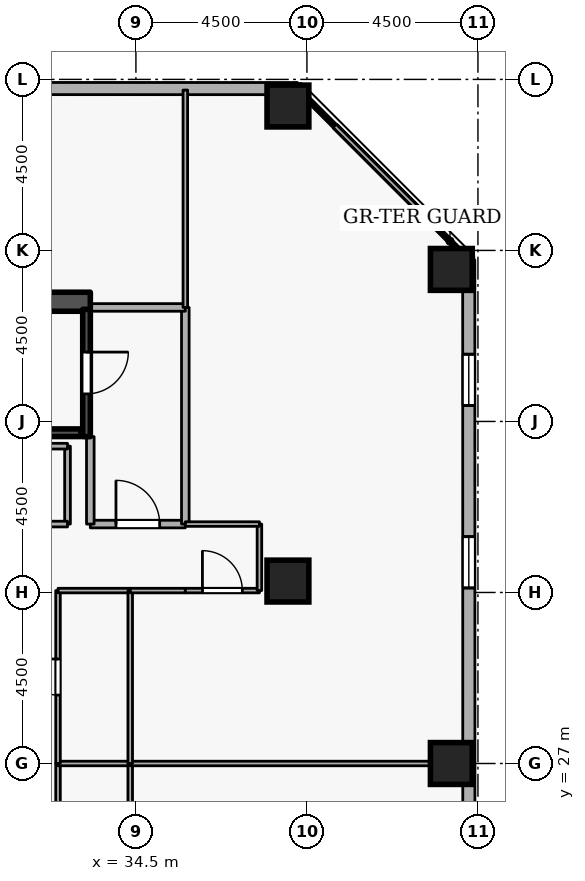
"""IFC4 building model, lengths in metres.
Left out: names, types, materials, properties, quantities, classifications, styles, units other than length and angle.
Written with IfcOpenShell. Run it as: python <this file> out.ifc"""

import sys

from ifc_helpers import new_model, si_unit, direction, frame, frame_2d, origin, origin_2d, place, context, subcontext, project, spatial, rectangle, extrude, element, fill, save


model = new_model("IFC4")
c1 = context("Model", 3, precision=1e-05, world=origin(), true_north=direction((0.0, 1.0)))
c2 = subcontext(c1, "Body", "Model", "MODEL_VIEW")
j1 = project(units=[si_unit("LENGTHUNIT", "METRE"), si_unit("PLANEANGLEUNIT", "RADIAN")], contexts=[c1])
p1 = place(None, origin())
s1 = spatial("IfcSite", under=j1, at=p1, CompositionType="ELEMENT")
p2 = place(p1, origin())
s2 = spatial("IfcBuilding", under=s1, at=p2, CompositionType="ELEMENT")
p3 = place(p2, frame((0.0, 0.0, 145.5)))
s3 = spatial("IfcBuildingStorey", under=s2, at=p3, CompositionType="ELEMENT", Elevation=145.5)
p4 = place(p3, frame((17.7, 39.15, 0.0), z_axis=(0.0, 0.0, 1.0), x_axis=(1.0, 0.0, 0.0)))
e1 = element("IfcWall", 1, at=p4, inside=s3, PredefinedType="SHEAR", context=c2, shape_type="SweptSolid", body=[
    extrude(rectangle(XDim=15.6, YDim=0.5, at=frame_2d((7.8, 0.0))), origin(), (0.0, 0.0, 1.0), 3.6),
])
for number, where, z_axis, x_axis in (
    (2, (42.8, 27.0, 0.0), (0.0, 0.0, 1.0), (1.0, 0.0, 0.0)),
    (3, (42.8, 40.0, 0.0), (0.0, 0.0, 1.0), (1.0, 0.0, 0.0)),
    (4, (38.5, 44.3, 0.0), (0.0, 0.0, 1.0), (1.0, 0.0, 0.0)),
    (5, (38.5, 31.8, 0.0), (0.0, 0.0, 1.0), (1.0, 0.0, 0.0)),
):
    element("IfcColumn", number, at=place(p3, frame(where, z_axis=z_axis, x_axis=x_axis)), inside=s3, PredefinedType="COLUMN", context=c2, shape_type="SweptSolid", body=[
        extrude(rectangle(XDim=1.1, YDim=1.1, at=origin_2d()), origin(), (0.0, 0.0, 1.0), 3.6),
    ])
p5 = place(p3, frame((43.265, 5.819, 0.0), z_axis=(0.0, 0.0, 1.0), x_axis=(-0.000184351399, 0.999999983007, 0.0)))
e6 = element("IfcWall", 6, at=p5, inside=s3, PredefinedType="STANDARD", context=c2, shape_type="SweptSolid", body=[
    extrude(rectangle(XDim=34.432, YDim=0.32, at=frame_2d((17.216, 0.0))), origin(), (0.0, 0.0, 1.0), 2.22),
])
p6 = place(p5, frame((1.8, 0.0, 0.72)))
e7 = element("IfcOpeningElement", 7, at=p6, cuts=e6, PredefinedType="OPENING", context=c2, shape_type="SweptSolid", body=[
    extrude(rectangle(XDim=1.35, YDim=1.05, at=frame_2d((0.675, 0.525))), frame((0.0, 0.17, 0.0), z_axis=(0.0, -1.0, 0.0), x_axis=(1.0, 0.0, 0.0)), (0.0, 0.0, 1.0), 0.34),
])
p7 = place(p5, frame((11.4, 0.0, 0.72)))
e8 = element("IfcOpeningElement", 8, at=p7, cuts=e6, PredefinedType="OPENING", context=c2, shape_type="SweptSolid", body=[
    extrude(rectangle(XDim=1.35, YDim=1.05, at=frame_2d((0.675, 0.525))), frame((0.0, 0.17, 0.0), z_axis=(0.0, -1.0, 0.0), x_axis=(1.0, 0.0, 0.0)), (0.0, 0.0, 1.0), 0.34),
])
p8 = place(p5, frame((16.2, 0.0, 0.72)))
e9 = element("IfcOpeningElement", 9, at=p8, cuts=e6, PredefinedType="OPENING", context=c2, shape_type="SweptSolid", body=[
    extrude(rectangle(XDim=1.35, YDim=1.05, at=frame_2d((0.675, 0.525))), frame((0.0, 0.17, 0.0), z_axis=(0.0, -1.0, 0.0), x_axis=(1.0, 0.0, 0.0)), (0.0, 0.0, 1.0), 0.34),
])
p9 = place(p5, frame((25.8, 0.0, 0.72)))
e10 = element("IfcOpeningElement", 10, at=p9, cuts=e6, PredefinedType="OPENING", context=c2, shape_type="SweptSolid", body=[
    extrude(rectangle(XDim=1.35, YDim=1.05, at=frame_2d((0.675, 0.525))), frame((0.0, 0.17, 0.0), z_axis=(0.0, -1.0, 0.0), x_axis=(1.0, 0.0, 0.0)), (0.0, 0.0, 1.0), 0.34),
])
p10 = place(p5, frame((30.6, 0.0, 0.72)))
e11 = element("IfcOpeningElement", 11, at=p10, cuts=e6, PredefinedType="OPENING", context=c2, shape_type="SweptSolid", body=[
    extrude(rectangle(XDim=1.35, YDim=1.05, at=frame_2d((0.675, 0.525))), frame((0.0, 0.17, 0.0), z_axis=(0.0, -1.0, 0.0), x_axis=(1.0, 0.0, 0.0)), (0.0, 0.0, 1.0), 0.34),
])
p11 = place(p3, frame((38.751, 44.758, 0.0), z_axis=(0.0, 0.0, 1.0), x_axis=(-0.999999983007, 0.000184351399, 0.0)))
e12 = element("IfcWall", 12, at=p11, inside=s3, PredefinedType="STANDARD", context=c2, shape_type="SweptSolid", body=[
    extrude(rectangle(XDim=34.432, YDim=0.32, at=frame_2d((17.216, 0.0))), origin(), (0.0, 0.0, 1.0), 2.22),
])
p12 = place(p11, frame((30.6, 0.0, 0.72)))
e13 = element("IfcOpeningElement", 13, at=p12, cuts=e12, PredefinedType="OPENING", context=c2, shape_type="SweptSolid", body=[
    extrude(rectangle(XDim=1.35, YDim=1.05, at=frame_2d((0.675, 0.525))), frame((0.0, 0.17, 0.0), z_axis=(0.0, -1.0, 0.0), x_axis=(1.0, 0.0, 0.0)), (0.0, 0.0, 1.0), 0.34),
])
p13 = place(p3, frame((33.2, 38.95, 0.0), z_axis=(0.0, 0.0, 1.0), x_axis=(0.0, -1.0, 0.0)))
e14 = element("IfcWall", 14, at=p13, inside=s3, PredefinedType="SHEAR", context=c2, shape_type="SweptSolid", body=[
    extrude(rectangle(XDim=3.35, YDim=0.2, at=frame_2d((1.675, 0.0))), origin(), (0.0, 0.0, 1.0), 3.6),
])
p14 = place(p13, frame((1.125, 0.0, 0.0)))
e15 = element("IfcOpeningElement", 15, at=p14, cuts=e14, PredefinedType="OPENING", context=c2, shape_type="SweptSolid", body=[
    extrude(rectangle(XDim=1.1, YDim=2.1, at=frame_2d((0.55, 1.05))), frame((0.0, 0.11, 0.0), z_axis=(0.0, -1.0, 0.0), x_axis=(1.0, 0.0, 0.0)), (0.0, 0.0, 1.0), 0.22),
])
p15 = place(p3, frame((25.95, 35.703, 0.0), z_axis=(0.0, 0.0, 1.0), x_axis=(1.0, 0.0, 0.0)))
e16 = element("IfcWall", 16, at=p15, inside=s3, PredefinedType="SHEAR", context=c2, shape_type="SweptSolid", body=[
    extrude(rectangle(XDim=7.1, YDim=0.2, at=frame_2d((3.55, 0.0))), origin(), (0.0, 0.0, 1.0), 3.6),
])
p16 = place(p3, frame((33.3, 33.3, 0.0), z_axis=(0.0, 0.0, 1.0), x_axis=(1.0, 0.0, 0.0)))
e17 = element("IfcWall", 17, at=p16, inside=s3, PredefinedType="STANDARD", context=c2, shape_type="SweptSolid", body=[
    extrude(rectangle(XDim=2.5, YDim=0.2, at=frame_2d((1.25, 0.0))), origin(), (0.0, 0.0, 1.0), 3.3),
])
p17 = place(p16, frame((0.675, 0.0, 0.0)))
e18 = element("IfcOpeningElement", 18, at=p17, cuts=e17, PredefinedType="OPENING", context=c2, shape_type="SweptSolid", body=[
    extrude(rectangle(XDim=1.15, YDim=2.1, at=frame_2d((0.575, 1.05))), frame((0.0, 0.11, 0.0), z_axis=(0.0, -1.0, 0.0), x_axis=(1.0, 0.0, 0.0)), (0.0, 0.0, 1.0), 0.22),
])
p18 = place(p3, frame((35.8, 33.3, 0.0), z_axis=(0.0, 0.0, 1.0), x_axis=(0.0, 1.0, 0.0)))
e19 = element("IfcWall", 19, at=p18, inside=s3, PredefinedType="STANDARD", context=c2, shape_type="SweptSolid", body=[
    extrude(rectangle(XDim=5.7, YDim=0.2, at=frame_2d((2.85, 0.0))), origin(), (0.0, 0.0, 1.0), 3.3),
])
p19 = place(p3, frame((35.8, 39.0, 0.0), z_axis=(0.0, 0.0, 1.0), x_axis=(-1.0, 0.0, 0.0)))
e20 = element("IfcWall", 20, at=p19, inside=s3, PredefinedType="STANDARD", context=c2, shape_type="SweptSolid", body=[
    extrude(rectangle(XDim=2.5, YDim=0.2, at=frame_2d((1.25, 0.0))), origin(), (0.0, 0.0, 1.0), 3.3),
])
p20 = place(p3, frame((33.3, 35.6, 0.0), z_axis=(0.0, 0.0, 1.0), x_axis=(0.0, -1.0, 0.0)))
e21 = element("IfcWall", 21, at=p20, inside=s3, PredefinedType="STANDARD", context=c2, shape_type="SweptSolid", body=[
    extrude(rectangle(XDim=2.3, YDim=0.2, at=frame_2d((1.15, 0.0))), origin(), (0.0, 0.0, 1.0), 2.505),
])
p21 = place(p3, frame((32.7, 35.35, 0.0), z_axis=(0.0, 0.0, 1.0), x_axis=(0.0, -1.0, 0.0)))
e22 = element("IfcWall", 22, at=p21, inside=s3, PredefinedType="PARTITIONING", context=c2, shape_type="SweptSolid", body=[
    extrude(rectangle(XDim=2.05, YDim=0.15, at=frame_2d((1.025, 0.0))), origin(), (0.0, 0.0, 1.0), 2.505),
])
p22 = place(p3, frame((32.7, 33.3, 0.0), z_axis=(0.0, 0.0, 1.0), x_axis=(-1.0, 0.0, 0.0)))
e23 = element("IfcWall", 23, at=p22, inside=s3, PredefinedType="PARTITIONING", context=c2, shape_type="SweptSolid", body=[
    extrude(rectangle(XDim=2.35, YDim=0.15, at=frame_2d((1.175, 0.0))), origin(), (0.0, 0.0, 1.0), 3.3),
])
p23 = place(p22, frame((0.715, 0.0, 0.0)))
e24 = element("IfcOpeningElement", 24, at=p23, cuts=e23, PredefinedType="OPENING", context=c2, shape_type="SweptSolid", body=[
    extrude(rectangle(XDim=0.92, YDim=2.08, at=frame_2d((0.46, 1.04))), frame((0.0, 0.085, 0.0), z_axis=(0.0, -1.0, 0.0), x_axis=(1.0, 0.0, 0.0)), (0.0, 0.0, 1.0), 0.17),
])
p24 = place(p3, frame((30.35, 35.35, 0.0), z_axis=(0.0, 0.0, 1.0), x_axis=(1.0, 0.0, 0.0)))
e25 = element("IfcWall", 25, at=p24, inside=s3, PredefinedType="PARTITIONING", context=c2, shape_type="SweptSolid", body=[
    extrude(rectangle(XDim=2.35, YDim=0.15, at=frame_2d((1.175, 0.0))), origin(), (0.0, 0.0, 1.0), 3.3),
])
p25 = place(p3, frame((32.45, 22.45, 0.0), z_axis=(0.0, 0.0, 1.0), x_axis=(0.0, 1.0, 0.0)))
e26 = element("IfcWall", 26, at=p25, inside=s3, PredefinedType="PARTITIONING", context=c2, shape_type="SweptSolid", body=[
    extrude(rectangle(XDim=4.55, YDim=0.12, at=frame_2d((2.275, 0.0))), origin(), (0.0, 0.0, 1.0), 3.3),
])
p26 = place(p25, frame((1.8, 0.0, 0.0)))
e27 = element("IfcOpeningElement", 27, at=p26, cuts=e26, PredefinedType="OPENING", context=c2, shape_type="SweptSolid", body=[
    extrude(rectangle(XDim=0.95, YDim=2.1, at=frame_2d((0.475, 1.05))), frame((0.0, 0.07, 0.0), z_axis=(0.0, -1.0, 0.0), x_axis=(1.0, 0.0, 0.0)), (0.0, 0.0, 1.0), 0.14),
])
p27 = place(p3, frame((32.45, 27.0, 0.0), z_axis=(0.0, 0.0, 1.0), x_axis=(1.0, 0.0, 0.0)))
e28 = element("IfcWall", 28, at=p27, inside=s3, PredefinedType="PARTITIONING", context=c2, shape_type="SweptSolid", body=[
    extrude(rectangle(XDim=1.9, YDim=0.12, at=frame_2d((0.95, 0.0))), origin(), (0.0, 0.0, 1.0), 1.685),
])
p28 = place(p3, frame((34.35, 27.0, 0.0), z_axis=(0.0, 0.0, 1.0), x_axis=(0.0, -1.0, 0.0)))
e29 = element("IfcWall", 29, at=p28, inside=s3, PredefinedType="PARTITIONING", context=c2, shape_type="SweptSolid", body=[
    extrude(rectangle(XDim=4.55, YDim=0.12, at=frame_2d((2.275, 0.0))), origin(), (0.0, 0.0, 1.0), 3.3),
])
p29 = place(p3, frame((34.35, 27.0, 0.0), z_axis=(0.0, 0.0, 1.0), x_axis=(1.0, 0.0, 0.0)))
e30 = element("IfcWall", 30, at=p29, inside=s3, PredefinedType="PARTITIONING", context=c2, shape_type="SweptSolid", body=[
    extrude(rectangle(XDim=8.87, YDim=0.12, at=frame_2d((4.435, 0.0))), origin(), (0.0, 0.0, 1.0), 1.685),
])
p30 = place(p3, frame((32.45, 27.0, 0.0), z_axis=(0.0, 0.0, 1.0), x_axis=(0.0, 1.0, 0.0)))
e31 = element("IfcWall", 31, at=p30, inside=s3, PredefinedType="PARTITIONING", context=c2, shape_type="SweptSolid", body=[
    extrude(rectangle(XDim=4.55, YDim=0.12, at=frame_2d((2.275, 0.0))), origin(), (0.0, 0.0, 1.0), 3.3),
])
p31 = place(p30, frame((1.8, 0.0, 0.0)))
e32 = element("IfcOpeningElement", 32, at=p31, cuts=e31, PredefinedType="OPENING", context=c2, shape_type="SweptSolid", body=[
    extrude(rectangle(XDim=0.95, YDim=2.1, at=frame_2d((0.475, 1.05))), frame((0.0, 0.07, 0.0), z_axis=(0.0, -1.0, 0.0), x_axis=(1.0, 0.0, 0.0)), (0.0, 0.0, 1.0), 0.14),
])
p32 = place(p3, frame((32.45, 31.55, 0.0), z_axis=(0.0, 0.0, 1.0), x_axis=(1.0, 0.0, 0.0)))
e33 = element("IfcWall", 33, at=p32, inside=s3, PredefinedType="PARTITIONING", context=c2, shape_type="SweptSolid", body=[
    extrude(rectangle(XDim=1.9, YDim=0.12, at=frame_2d((0.95, 0.0))), origin(), (0.0, 0.0, 1.0), 3.3),
])
p33 = place(p3, frame((34.35, 31.55, 0.0), z_axis=(0.0, 0.0, 1.0), x_axis=(0.0, -1.0, 0.0)))
e34 = element("IfcWall", 34, at=p33, inside=s3, PredefinedType="PARTITIONING", context=c2, shape_type="SweptSolid", body=[
    extrude(rectangle(XDim=4.55, YDim=0.12, at=frame_2d((2.275, 0.0))), origin(), (0.0, 0.0, 1.0), 3.3),
])
p34 = place(p3, frame((34.35, 31.55, 0.0), z_axis=(0.0, 0.0, 1.0), x_axis=(1.0, 0.0, 0.0)))
e35 = element("IfcWall", 35, at=p34, inside=s3, PredefinedType="PARTITIONING", context=c2, shape_type="SweptSolid", body=[
    extrude(rectangle(XDim=1.45, YDim=0.12, at=frame_2d((0.725, 0.0))), origin(), (0.0, 0.0, 1.0), 3.3),
])
p35 = place(p3, frame((35.8, 31.55, 0.0), z_axis=(0.0, 0.0, 1.0), x_axis=(1.0, 0.0, 0.0)))
e36 = element("IfcWall", 36, at=p35, inside=s3, PredefinedType="PARTITIONING", context=c2, shape_type="SweptSolid", body=[
    extrude(rectangle(XDim=1.95, YDim=0.12, at=frame_2d((0.975, 0.0))), origin(), (0.0, 0.0, 1.0), 3.3),
])
p36 = place(p35, frame((0.45, 0.0, 0.0)))
e37 = element("IfcOpeningElement", 37, at=p36, cuts=e36, PredefinedType="OPENING", context=c2, shape_type="SweptSolid", body=[
    extrude(rectangle(XDim=1.05, YDim=2.1, at=frame_2d((0.525, 1.05))), frame((0.0, 0.07, 0.0), z_axis=(0.0, -1.0, 0.0), x_axis=(1.0, 0.0, 0.0)), (0.0, 0.0, 1.0), 0.14),
])
p37 = place(p3, frame((37.75, 31.55, 0.0), z_axis=(0.0, 0.0, 1.0), x_axis=(0.0, 1.0, 0.0)))
e38 = element("IfcWall", 38, at=p37, inside=s3, PredefinedType="PARTITIONING", context=c2, shape_type="SweptSolid", body=[
    extrude(rectangle(XDim=1.75, YDim=0.12, at=frame_2d((0.875, 0.0))), origin(), (0.0, 0.0, 1.0), 3.3),
])
p38 = place(p3, frame((37.75, 33.3, 0.0), z_axis=(0.0, 0.0, 1.0), x_axis=(-1.0, 0.0, 0.0)))
e39 = element("IfcWall", 39, at=p38, inside=s3, PredefinedType="PARTITIONING", context=c2, shape_type="SweptSolid", body=[
    extrude(rectangle(XDim=1.95, YDim=0.12, at=frame_2d((0.975, 0.0))), origin(), (0.0, 0.0, 1.0), 3.3),
])
p39 = place(p3, frame((35.8, 39.0, 0.0), z_axis=(0.0, 0.0, 1.0), x_axis=(0.0, 1.0, 0.0)))
e40 = element("IfcWall", 40, at=p39, inside=s3, PredefinedType="PARTITIONING", context=c2, shape_type="SweptSolid", body=[
    extrude(rectangle(XDim=5.72, YDim=0.12, at=frame_2d((2.86, 0.0))), origin(), (0.0, 0.0, 1.0), 3.3),
])
p40 = place(p3, frame((38.787, 44.72, 0.0), z_axis=(0.0, 0.0, 1.0), x_axis=(0.707106781187, -0.707106781187, 0.0)))
e41 = element("IfcWall", 41, at=p40, inside=s3, PredefinedType="PARTITIONING", context=c2, shape_type="SweptSolid", body=[
    extrude(rectangle(XDim=6.269, YDim=0.12, at=frame_2d((3.134, 0.0))), origin(), (0.0, 0.0, 1.0), 3.3),
])
p41 = place(p9, origin())
e42 = element("IfcWindow", 42, at=p41, inside=s3, PartitioningType="SINGLE_PANEL", PredefinedType="WINDOW", context=c2, shape_type="SweptSolid", body=[
    extrude(rectangle(XDim=1.35, YDim=1.05, at=frame_2d((0.675, 0.525))), frame((0.0, 0.03, 0.0), z_axis=(0.0, -1.0, 0.0), x_axis=(1.0, 0.0, 0.0)), (0.0, 0.0, 1.0), 0.06),
])
fill(e10, e42)
p42 = place(p10, origin())
e43 = element("IfcWindow", 43, at=p42, inside=s3, PartitioningType="SINGLE_PANEL", PredefinedType="WINDOW", context=c2, shape_type="SweptSolid", body=[
    extrude(rectangle(XDim=1.35, YDim=1.05, at=frame_2d((0.675, 0.525))), frame((0.0, 0.03, 0.0), z_axis=(0.0, -1.0, 0.0), x_axis=(1.0, 0.0, 0.0)), (0.0, 0.0, 1.0), 0.06),
])
fill(e11, e43)
p43 = place(p14, origin())
e44 = element("IfcDoor", 44, at=p43, inside=s3, OperationType="SINGLE_SWING_LEFT", PredefinedType="DOOR", context=c2, shape_type="SweptSolid", body=[
    extrude(rectangle(XDim=1.1, YDim=2.1, at=frame_2d((0.55, 1.05))), frame((0.0, 0.025, 0.0), z_axis=(0.0, -1.0, 0.0), x_axis=(1.0, 0.0, 0.0)), (0.0, 0.0, 1.0), 0.05),
])
fill(e15, e44)
p44 = place(p17, origin())
e45 = element("IfcDoor", 45, at=p44, inside=s3, OperationType="SINGLE_SWING_LEFT", PredefinedType="DOOR", context=c2, shape_type="SweptSolid", body=[
    extrude(rectangle(XDim=1.15, YDim=2.1, at=frame_2d((0.575, 1.05))), frame((0.0, 0.025, 0.0), z_axis=(0.0, -1.0, 0.0), x_axis=(1.0, 0.0, 0.0)), (0.0, 0.0, 1.0), 0.05),
])
fill(e18, e45)
p45 = place(p31, origin())
e46 = element("IfcDoor", 46, at=p45, inside=s3, OperationType="SINGLE_SWING_RIGHT", PredefinedType="DOOR", context=c2, shape_type="SweptSolid", body=[
    extrude(rectangle(XDim=0.95, YDim=2.1, at=frame_2d((0.475, 1.05))), frame((0.0, 0.025, 0.0), z_axis=(0.0, -1.0, 0.0), x_axis=(1.0, 0.0, 0.0)), (0.0, 0.0, 1.0), 0.05),
])
fill(e32, e46)
p46 = place(p36, origin())
e47 = element("IfcDoor", 47, at=p46, inside=s3, OperationType="SINGLE_SWING_LEFT", PredefinedType="DOOR", context=c2, shape_type="SweptSolid", body=[
    extrude(rectangle(XDim=1.05, YDim=2.1, at=frame_2d((0.525, 1.05))), frame((0.0, 0.025, 0.0), z_axis=(0.0, -1.0, 0.0), x_axis=(1.0, 0.0, 0.0)), (0.0, 0.0, 1.0), 0.05),
])
fill(e37, e47)
save(model, sys.argv[1])
